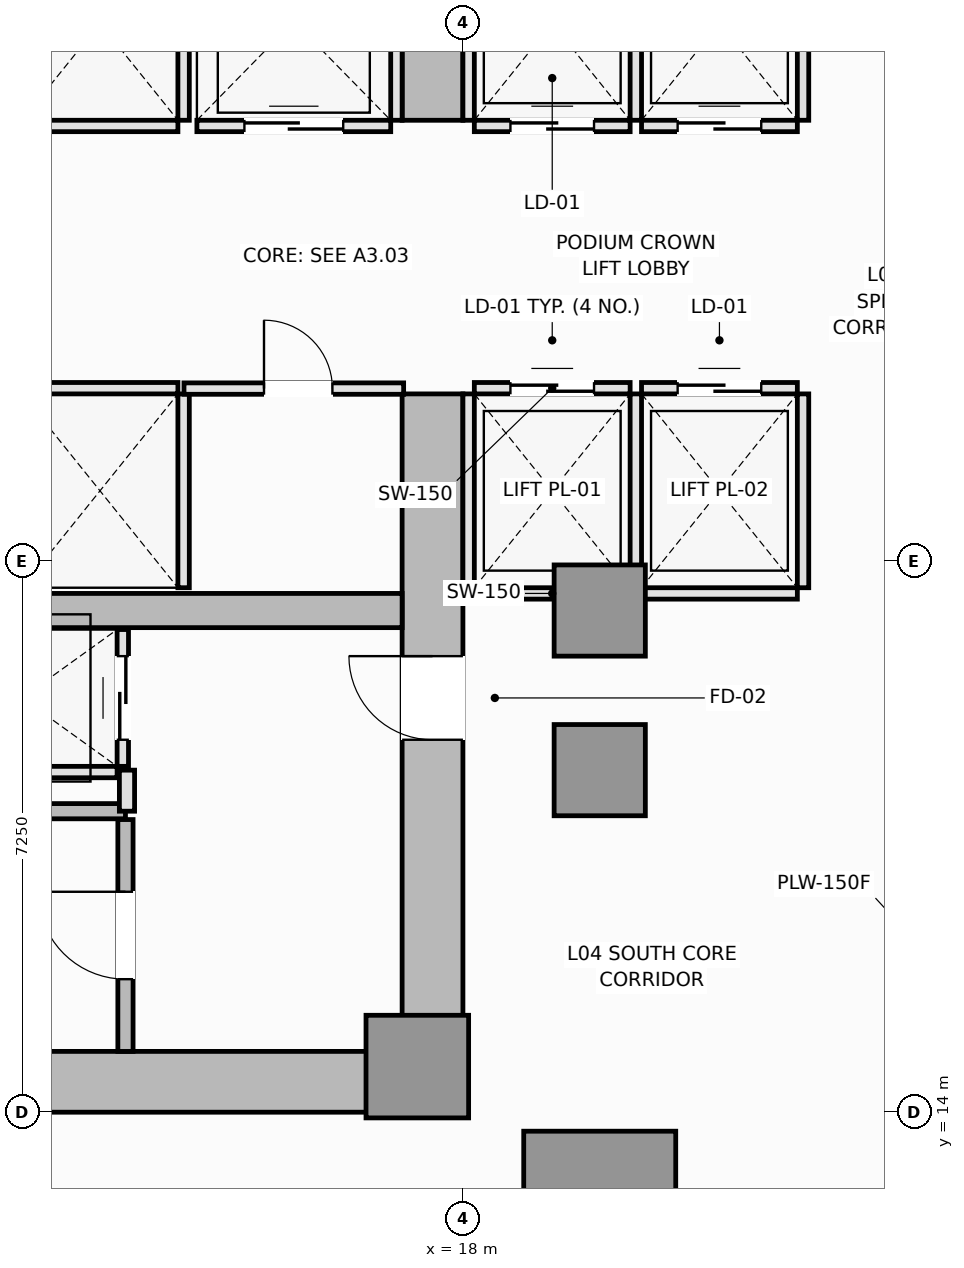
"""IFC4 building model, lengths in metres.
Left out: names, types, materials, properties, quantities, classifications, styles, units other than length and angle.
Written with IfcOpenShell. Run it as: python <this file> out.ifc"""

import sys

from ifc_helpers import new_model, si_unit, direction, frame, frame_2d, origin, origin_2d, place, context, subcontext, project, spatial, rectangle, extrude, element, fill, save


model = new_model("IFC4")
c1 = context("Model", 3, precision=1e-05, world=origin(), true_north=direction((0.0, 1.0)))
c2 = subcontext(c1, "Body", "Model", "MODEL_VIEW")
j1 = project(units=[si_unit("LENGTHUNIT", "METRE"), si_unit("PLANEANGLEUNIT", "RADIAN")], contexts=[c1])
p1 = place(None, origin())
s1 = spatial("IfcSite", under=j1, at=p1, CompositionType="ELEMENT")
p2 = place(p1, origin())
s2 = spatial("IfcBuilding", under=s1, at=p2, CompositionType="ELEMENT")
p3 = place(p2, frame((0.0, 0.0, 20.4)))
s3 = spatial("IfcBuildingStorey", under=s2, at=p3, CompositionType="ELEMENT", Elevation=20.4)
p4 = place(p3, frame((4.5, 14.4, 0.0), z_axis=(0.0, 0.0, 1.0), x_axis=(1.0, 0.0, 0.0)))
e1 = element("IfcWall", 1, at=p4, inside=s3, PredefinedType="SHEAR", context=c2, shape_type="SweptSolid", body=[
    extrude(rectangle(XDim=13.5, YDim=0.8, at=frame_2d((6.75, 0.0))), origin(), (0.0, 0.0, 1.0), 5.2),
])
p5 = place(p3, frame((17.6, 14.8, 0.0), z_axis=(0.0, 0.0, 1.0), x_axis=(0.0, 1.0, 0.0)))
e2 = element("IfcWall", 2, at=p5, inside=s3, PredefinedType="SHEAR", context=c2, shape_type="SweptSolid", body=[
    extrude(rectangle(XDim=8.65, YDim=0.8, at=frame_2d((4.325, 0.0))), origin(), (0.0, 0.0, 1.0), 5.2),
])
p6 = place(p5, frame((4.1, 0.0, 0.0)))
e3 = element("IfcOpeningElement", 3, at=p6, cuts=e2, PredefinedType="OPENING", context=c2, shape_type="SweptSolid", body=[
    extrude(rectangle(XDim=1.1, YDim=2.15, at=frame_2d((0.55, 1.075))), frame((0.0, 0.41, 0.0), z_axis=(0.0, -1.0, 0.0), x_axis=(1.0, 0.0, 0.0)), (0.0, 0.0, 1.0), 0.82),
])
p7 = place(p3, frame((17.6, 27.05, 0.0), z_axis=(0.0, 0.0, 1.0), x_axis=(0.0, 1.0, 0.0)))
e4 = element("IfcWall", 4, at=p7, inside=s3, PredefinedType="SHEAR", context=c2, shape_type="SweptSolid", body=[
    extrude(rectangle(XDim=8.65, YDim=0.8, at=frame_2d((4.325, 0.0))), origin(), (0.0, 0.0, 1.0), 5.2),
])
p8 = place(p7, frame((3.45, 0.0, 0.0)))
e5 = element("IfcOpeningElement", 5, at=p8, cuts=e4, PredefinedType="OPENING", context=c2, shape_type="SweptSolid", body=[
    extrude(rectangle(XDim=1.1, YDim=2.15, at=frame_2d((0.55, 1.075))), frame((0.0, 0.41, 0.0), z_axis=(0.0, -1.0, 0.0), x_axis=(1.0, 0.0, 0.0)), (0.0, 0.0, 1.0), 0.82),
])
p9 = place(p3, frame((5.3, 20.6, 0.0), z_axis=(0.0, 0.0, 1.0), x_axis=(1.0, 0.0, 0.0)))
e6 = element("IfcWall", 6, at=p9, inside=s3, PredefinedType="SHEAR", context=c2, shape_type="SweptSolid", body=[
    extrude(rectangle(XDim=11.9, YDim=0.45, at=frame_2d((5.95, 0.0))), origin(), (0.0, 0.0, 1.0), 5.2),
])
p10 = place(p3, frame((17.4, 14.6, 0.0), z_axis=(0.0, 0.0, 1.0), x_axis=(1.0, 0.0, 0.0)))
e7 = element("IfcColumn", 7, at=p10, inside=s3, PredefinedType="PILASTER", context=c2, shape_type="SweptSolid", body=[
    extrude(rectangle(XDim=1.35, YDim=1.35, at=origin_2d()), origin(), (0.0, 0.0, 1.0), 5.2),
])
p11 = place(p3, frame((19.8, 12.75, 0.0), z_axis=(0.0, 0.0, 1.0), x_axis=(1.0, 0.0, 0.0)))
e8 = element("IfcColumn", 8, at=p11, inside=s3, PredefinedType="COLUMN", context=c2, shape_type="SweptSolid", body=[
    extrude(rectangle(XDim=2.0, YDim=2.0, at=origin_2d()), origin(), (0.0, 0.0, 1.0), 5.2),
])
for number, where, z_axis, x_axis in (
    (9, (19.8, 18.5, 0.0), (0.0, 0.0, 1.0), (1.0, 0.0, 0.0)),
    (10, (19.8, 20.6, 0.0), (0.0, 0.0, 1.0), (1.0, 0.0, 0.0)),
):
    element("IfcColumn", number, at=place(p3, frame(where, z_axis=z_axis, x_axis=x_axis)), inside=s3, PredefinedType="COLUMN", context=c2, shape_type="SweptSolid", body=[
        extrude(rectangle(XDim=1.2, YDim=1.2, at=origin_2d()), origin(), (0.0, 0.0, 1.0), 5.2),
    ])
p12 = place(p3, frame((5.9, 17.96, 0.0), z_axis=(0.0, 0.0, 1.0), x_axis=(1.0, 0.0, 0.0)))
e11 = element("IfcWall", 11, at=p12, inside=s3, PredefinedType="SOLIDWALL", context=c2, shape_type="SweptSolid", body=[
    extrude(rectangle(XDim=7.66, YDim=0.2, at=frame_2d((3.83, 0.0))), origin(), (0.0, 0.0, 1.0), 5.2),
])
p13 = place(p3, frame((13.56, 14.8, 0.0), z_axis=(0.0, 0.0, 1.0), x_axis=(0.0, 1.0, 0.0)))
e12 = element("IfcWall", 12, at=p13, inside=s3, PredefinedType="SOLIDWALL", context=c2, shape_type="SweptSolid", body=[
    extrude(rectangle(XDim=3.05, YDim=0.2, at=frame_2d((1.525, 0.0))), origin(), (0.0, 0.0, 1.0), 5.2),
])
p14 = place(p13, frame((0.95, 0.0, 0.0)))
e13 = element("IfcOpeningElement", 13, at=p14, cuts=e12, PredefinedType="OPENING", context=c2, shape_type="SweptSolid", body=[
    extrude(rectangle(XDim=1.15, YDim=2.15, at=frame_2d((0.575, 1.075))), frame((0.0, 0.11, 0.0), z_axis=(0.0, -1.0, 0.0), x_axis=(1.0, 0.0, 0.0)), (0.0, 0.0, 1.0), 0.22),
])
p15 = place(p3, frame((18.15, 20.825, 0.0), z_axis=(0.0, 0.0, 1.0), x_axis=(1.0, 0.0, 0.0)))
e14 = element("IfcWall", 14, at=p15, inside=s3, PredefinedType="PARTITIONING", context=c2, shape_type="SweptSolid", body=[
    extrude(rectangle(XDim=2.05, YDim=0.15, at=frame_2d((1.025, 0.0))), origin(), (0.0, 0.0, 1.0), 5.02),
])
p16 = place(p3, frame((18.15, 23.525, 0.0), z_axis=(0.0, 0.0, 1.0), x_axis=(1.0, 0.0, 0.0)))
e15 = element("IfcWall", 15, at=p16, inside=s3, PredefinedType="PARTITIONING", context=c2, shape_type="SweptSolid", body=[
    extrude(rectangle(XDim=2.05, YDim=0.15, at=frame_2d((1.025, 0.0))), origin(), (0.0, 0.0, 1.0), 5.02),
])
p17 = place(p16, frame((0.475, 0.0, 0.0)))
e16 = element("IfcOpeningElement", 16, at=p17, cuts=e15, PredefinedType="OPENING", context=c2, shape_type="SweptSolid", body=[
    extrude(rectangle(XDim=1.1, YDim=2.2, at=frame_2d((0.55, 1.1))), frame((0.0, 0.085, 0.0), z_axis=(0.0, -1.0, 0.0), x_axis=(1.0, 0.0, 0.0)), (0.0, 0.0, 1.0), 0.17),
])
for number, where, z_axis, x_axis in (
    (17, (18.075, 20.9, 0.0), (0.0, 0.0, 1.0), (0.0, 1.0, 0.0)),
    (18, (20.275, 20.9, 0.0), (0.0, 0.0, 1.0), (0.0, 1.0, 0.0)),
):
    element("IfcWall", number, at=place(p3, frame(where, z_axis=z_axis, x_axis=x_axis)), inside=s3, PredefinedType="PARTITIONING", context=c2, shape_type="SweptSolid", body=[
        extrude(rectangle(XDim=2.55, YDim=0.15, at=frame_2d((1.275, 0.0))), origin(), (0.0, 0.0, 1.0), 5.02),
    ])
p18 = place(p3, frame((20.35, 20.825, 0.0), z_axis=(0.0, 0.0, 1.0), x_axis=(1.0, 0.0, 0.0)))
e19 = element("IfcWall", 19, at=p18, inside=s3, PredefinedType="PARTITIONING", context=c2, shape_type="SweptSolid", body=[
    extrude(rectangle(XDim=2.05, YDim=0.15, at=frame_2d((1.025, 0.0))), origin(), (0.0, 0.0, 1.0), 5.02),
])
p19 = place(p3, frame((20.35, 23.525, 0.0), z_axis=(0.0, 0.0, 1.0), x_axis=(1.0, 0.0, 0.0)))
e20 = element("IfcWall", 20, at=p19, inside=s3, PredefinedType="PARTITIONING", context=c2, shape_type="SweptSolid", body=[
    extrude(rectangle(XDim=2.05, YDim=0.15, at=frame_2d((1.025, 0.0))), origin(), (0.0, 0.0, 1.0), 5.02),
])
p20 = place(p19, frame((0.475, 0.0, 0.0)))
e21 = element("IfcOpeningElement", 21, at=p20, cuts=e20, PredefinedType="OPENING", context=c2, shape_type="SweptSolid", body=[
    extrude(rectangle(XDim=1.1, YDim=2.2, at=frame_2d((0.55, 1.1))), frame((0.0, 0.085, 0.0), z_axis=(0.0, -1.0, 0.0), x_axis=(1.0, 0.0, 0.0)), (0.0, 0.0, 1.0), 0.17),
])
p21 = place(p3, frame((22.475, 20.9, 0.0), z_axis=(0.0, 0.0, 1.0), x_axis=(0.0, 1.0, 0.0)))
e22 = element("IfcWall", 22, at=p21, inside=s3, PredefinedType="PARTITIONING", context=c2, shape_type="SweptSolid", body=[
    extrude(rectangle(XDim=2.55, YDim=0.15, at=frame_2d((1.275, 0.0))), origin(), (0.0, 0.0, 1.0), 4.57),
])
p22 = place(p3, frame((18.15, 26.975, 0.0), z_axis=(0.0, 0.0, 1.0), x_axis=(1.0, 0.0, 0.0)))
e23 = element("IfcWall", 23, at=p22, inside=s3, PredefinedType="PARTITIONING", context=c2, shape_type="SweptSolid", body=[
    extrude(rectangle(XDim=2.05, YDim=0.15, at=frame_2d((1.025, 0.0))), origin(), (0.0, 0.0, 1.0), 5.02),
])
p23 = place(p22, frame((0.475, 0.0, 0.0)))
e24 = element("IfcOpeningElement", 24, at=p23, cuts=e23, PredefinedType="OPENING", context=c2, shape_type="SweptSolid", body=[
    extrude(rectangle(XDim=1.1, YDim=2.2, at=frame_2d((0.55, 1.1))), frame((0.0, 0.085, 0.0), z_axis=(0.0, -1.0, 0.0), x_axis=(1.0, 0.0, 0.0)), (0.0, 0.0, 1.0), 0.17),
])
for number, where, z_axis, x_axis in (
    (25, (18.075, 27.05, 0.0), (0.0, 0.0, 1.0), (0.0, 1.0, 0.0)),
    (26, (20.275, 27.05, 0.0), (0.0, 0.0, 1.0), (0.0, 1.0, 0.0)),
):
    element("IfcWall", number, at=place(p3, frame(where, z_axis=z_axis, x_axis=x_axis)), inside=s3, PredefinedType="PARTITIONING", context=c2, shape_type="SweptSolid", body=[
        extrude(rectangle(XDim=2.55, YDim=0.15, at=frame_2d((1.275, 0.0))), origin(), (0.0, 0.0, 1.0), 5.02),
    ])
p24 = place(p3, frame((20.35, 26.975, 0.0), z_axis=(0.0, 0.0, 1.0), x_axis=(1.0, 0.0, 0.0)))
e27 = element("IfcWall", 27, at=p24, inside=s3, PredefinedType="PARTITIONING", context=c2, shape_type="SweptSolid", body=[
    extrude(rectangle(XDim=2.05, YDim=0.15, at=frame_2d((1.025, 0.0))), origin(), (0.0, 0.0, 1.0), 5.02),
])
p25 = place(p24, frame((0.475, 0.0, 0.0)))
e28 = element("IfcOpeningElement", 28, at=p25, cuts=e27, PredefinedType="OPENING", context=c2, shape_type="SweptSolid", body=[
    extrude(rectangle(XDim=1.1, YDim=2.2, at=frame_2d((0.55, 1.1))), frame((0.0, 0.085, 0.0), z_axis=(0.0, -1.0, 0.0), x_axis=(1.0, 0.0, 0.0)), (0.0, 0.0, 1.0), 0.17),
])
p26 = place(p3, frame((22.475, 27.05, 0.0), z_axis=(0.0, 0.0, 1.0), x_axis=(0.0, 1.0, 0.0)))
e29 = element("IfcWall", 29, at=p26, inside=s3, PredefinedType="PARTITIONING", context=c2, shape_type="SweptSolid", body=[
    extrude(rectangle(XDim=2.55, YDim=0.15, at=frame_2d((1.275, 0.0))), origin(), (0.0, 0.0, 1.0), 4.57),
])
p27 = place(p3, frame((12.2, 23.525, 0.0), z_axis=(0.0, 0.0, 1.0), x_axis=(1.0, 0.0, 0.0)))
e30 = element("IfcWall", 30, at=p27, inside=s3, PredefinedType="PARTITIONING", context=c2, shape_type="SweptSolid", body=[
    extrude(rectangle(XDim=2.05, YDim=0.15, at=frame_2d((1.025, 0.0))), origin(), (0.0, 0.0, 1.0), 5.02),
])
p28 = place(p3, frame((14.325, 20.9, 0.0), z_axis=(0.0, 0.0, 1.0), x_axis=(0.0, 1.0, 0.0)))
e31 = element("IfcWall", 31, at=p28, inside=s3, PredefinedType="PARTITIONING", context=c2, shape_type="SweptSolid", body=[
    extrude(rectangle(XDim=2.55, YDim=0.15, at=frame_2d((1.275, 0.0))), origin(), (0.0, 0.0, 1.0), 5.02),
])
p29 = place(p3, frame((12.2, 26.975, 0.0), z_axis=(0.0, 0.0, 1.0), x_axis=(1.0, 0.0, 0.0)))
e32 = element("IfcWall", 32, at=p29, inside=s3, PredefinedType="PARTITIONING", context=c2, shape_type="SweptSolid", body=[
    extrude(rectangle(XDim=2.05, YDim=0.15, at=frame_2d((1.025, 0.0))), origin(), (0.0, 0.0, 1.0), 5.02),
])
p30 = place(p3, frame((14.325, 27.05, 0.0), z_axis=(0.0, 0.0, 1.0), x_axis=(0.0, 1.0, 0.0)))
e33 = element("IfcWall", 33, at=p30, inside=s3, PredefinedType="PARTITIONING", context=c2, shape_type="SweptSolid", body=[
    extrude(rectangle(XDim=2.55, YDim=0.15, at=frame_2d((1.275, 0.0))), origin(), (0.0, 0.0, 1.0), 5.02),
])
p31 = place(p3, frame((14.5, 26.975, 0.0), z_axis=(0.0, 0.0, 1.0), x_axis=(1.0, 0.0, 0.0)))
e34 = element("IfcWall", 34, at=p31, inside=s3, PredefinedType="PARTITIONING", context=c2, shape_type="SweptSolid", body=[
    extrude(rectangle(XDim=2.55, YDim=0.15, at=frame_2d((1.275, 0.0))), origin(), (0.0, 0.0, 1.0), 5.02),
])
p32 = place(p31, frame((0.625, 0.0, 0.0)))
e35 = element("IfcOpeningElement", 35, at=p32, cuts=e34, PredefinedType="OPENING", context=c2, shape_type="SweptSolid", body=[
    extrude(rectangle(XDim=1.3, YDim=2.2, at=frame_2d((0.65, 1.1))), frame((0.0, 0.085, 0.0), z_axis=(0.0, -1.0, 0.0), x_axis=(1.0, 0.0, 0.0)), (0.0, 0.0, 1.0), 0.17),
])
p33 = place(p3, frame((17.125, 27.05, 0.0), z_axis=(0.0, 0.0, 1.0), x_axis=(0.0, 1.0, 0.0)))
e36 = element("IfcWall", 36, at=p33, inside=s3, PredefinedType="PARTITIONING", context=c2, shape_type="SweptSolid", body=[
    extrude(rectangle(XDim=2.6, YDim=0.15, at=frame_2d((1.3, 0.0))), origin(), (0.0, 0.0, 1.0), 5.02),
])
p34 = place(p3, frame((10.95, 18.475, 0.0), z_axis=(0.0, 0.0, 1.0), x_axis=(1.0, 0.0, 0.0)))
e37 = element("IfcWall", 37, at=p34, inside=s3, PredefinedType="PARTITIONING", context=c2, shape_type="SweptSolid", body=[
    extrude(rectangle(XDim=2.5, YDim=0.15, at=frame_2d((1.25, 0.0))), origin(), (0.0, 0.0, 1.0), 5.02),
])
p35 = place(p3, frame((13.525, 18.55, 0.0), z_axis=(0.0, 0.0, 1.0), x_axis=(0.0, 1.0, 0.0)))
e38 = element("IfcWall", 38, at=p35, inside=s3, PredefinedType="PARTITIONING", context=c2, shape_type="SweptSolid", body=[
    extrude(rectangle(XDim=1.8, YDim=0.15, at=frame_2d((0.9, 0.0))), origin(), (0.0, 0.0, 1.0), 5.02),
])
p36 = place(p35, frame((0.35, 0.0, 0.0)))
e39 = element("IfcOpeningElement", 39, at=p36, cuts=e38, PredefinedType="OPENING", context=c2, shape_type="SweptSolid", body=[
    extrude(rectangle(XDim=1.1, YDim=2.2, at=frame_2d((0.55, 1.1))), frame((0.0, 0.085, 0.0), z_axis=(0.0, -1.0, 0.0), x_axis=(1.0, 0.0, 0.0)), (0.0, 0.0, 1.0), 0.17),
])
p37 = place(p3, frame((13.58, 17.96, 0.0), z_axis=(0.0, 0.0, 1.0), x_axis=(0.0, 1.0, 0.0)))
e40 = element("IfcWall", 40, at=p37, inside=s3, PredefinedType="PARTITIONING", context=c2, shape_type="SweptSolid", body=[
    extrude(rectangle(XDim=0.54, YDim=0.2, at=frame_2d((0.27, 0.0))), origin(), (0.0, 0.0, 1.0), 5.02),
])
p38 = place(p3, frame((14.33, 23.52, 0.0), z_axis=(0.0, 0.0, 1.0), x_axis=(1.0, 0.0, 0.0)))
e41 = element("IfcWall", 41, at=p38, inside=s3, PredefinedType="PARTITIONING", context=c2, shape_type="SweptSolid", body=[
    extrude(rectangle(XDim=2.89, YDim=0.15, at=frame_2d((1.445, 0.0))), origin(), (0.0, 0.0, 1.0), 5.02),
])
p39 = place(p38, frame((1.053, 0.0, 0.0)))
e42 = element("IfcOpeningElement", 42, at=p39, cuts=e41, PredefinedType="OPENING", context=c2, shape_type="SweptSolid", body=[
    extrude(rectangle(XDim=0.9, YDim=2.1, at=frame_2d((0.45, 1.05))), frame((0.0, 0.085, 0.0), z_axis=(0.0, -1.0, 0.0), x_axis=(1.0, 0.0, 0.0)), (0.0, 0.0, 1.0), 0.17),
])
p40 = place(p14, origin())
e43 = element("IfcDoor", 43, at=p40, inside=s3, OperationType="SINGLE_SWING_RIGHT", PredefinedType="DOOR", context=c2, shape_type="SweptSolid", body=[
    extrude(rectangle(XDim=1.15, YDim=2.15, at=frame_2d((0.575, 1.075))), frame((0.0, 0.025, 0.0), z_axis=(0.0, -1.0, 0.0), x_axis=(1.0, 0.0, 0.0)), (0.0, 0.0, 1.0), 0.05),
])
fill(e13, e43)
p41 = place(p17, origin())
e44 = element("IfcDoor", 44, at=p41, inside=s3, OperationType="DOUBLE_DOOR_SLIDING", PredefinedType="DOOR", context=c2, shape_type="SweptSolid", body=[
    extrude(rectangle(XDim=1.1, YDim=2.2, at=frame_2d((0.55, 1.1))), frame((0.0, 0.025, 0.0), z_axis=(0.0, -1.0, 0.0), x_axis=(1.0, 0.0, 0.0)), (0.0, 0.0, 1.0), 0.05),
])
fill(e16, e44)
p42 = place(p20, origin())
e45 = element("IfcDoor", 45, at=p42, inside=s3, OperationType="DOUBLE_DOOR_SLIDING", PredefinedType="DOOR", context=c2, shape_type="SweptSolid", body=[
    extrude(rectangle(XDim=1.1, YDim=2.2, at=frame_2d((0.55, 1.1))), frame((0.0, 0.025, 0.0), z_axis=(0.0, -1.0, 0.0), x_axis=(1.0, 0.0, 0.0)), (0.0, 0.0, 1.0), 0.05),
])
fill(e21, e45)
p43 = place(p23, origin())
e46 = element("IfcDoor", 46, at=p43, inside=s3, OperationType="DOUBLE_DOOR_SLIDING", PredefinedType="DOOR", context=c2, shape_type="SweptSolid", body=[
    extrude(rectangle(XDim=1.1, YDim=2.2, at=frame_2d((0.55, 1.1))), frame((0.0, 0.025, 0.0), z_axis=(0.0, -1.0, 0.0), x_axis=(1.0, 0.0, 0.0)), (0.0, 0.0, 1.0), 0.05),
])
fill(e24, e46)
p44 = place(p25, origin())
e47 = element("IfcDoor", 47, at=p44, inside=s3, OperationType="DOUBLE_DOOR_SLIDING", PredefinedType="DOOR", context=c2, shape_type="SweptSolid", body=[
    extrude(rectangle(XDim=1.1, YDim=2.2, at=frame_2d((0.55, 1.1))), frame((0.0, 0.025, 0.0), z_axis=(0.0, -1.0, 0.0), x_axis=(1.0, 0.0, 0.0)), (0.0, 0.0, 1.0), 0.05),
])
fill(e28, e47)
p45 = place(p32, origin())
e48 = element("IfcDoor", 48, at=p45, inside=s3, OperationType="DOUBLE_DOOR_SLIDING", PredefinedType="DOOR", context=c2, shape_type="SweptSolid", body=[
    extrude(rectangle(XDim=1.3, YDim=2.2, at=frame_2d((0.65, 1.1))), frame((0.0, 0.025, 0.0), z_axis=(0.0, -1.0, 0.0), x_axis=(1.0, 0.0, 0.0)), (0.0, 0.0, 1.0), 0.05),
])
fill(e35, e48)
p46 = place(p36, origin())
e49 = element("IfcDoor", 49, at=p46, inside=s3, OperationType="DOUBLE_DOOR_SLIDING", PredefinedType="DOOR", context=c2, shape_type="SweptSolid", body=[
    extrude(rectangle(XDim=1.1, YDim=2.2, at=frame_2d((0.55, 1.1))), frame((0.0, 0.025, 0.0), z_axis=(0.0, -1.0, 0.0), x_axis=(1.0, 0.0, 0.0)), (0.0, 0.0, 1.0), 0.05),
])
fill(e39, e49)
p47 = place(p6, origin())
e50 = element("IfcDoor", 50, at=p47, inside=s3, OperationType="SINGLE_SWING_RIGHT", PredefinedType="DOOR", context=c2, shape_type="SweptSolid", body=[
    extrude(rectangle(XDim=1.1, YDim=2.15, at=frame_2d((0.55, 1.075))), frame((0.0, 0.025, 0.0), z_axis=(0.0, -1.0, 0.0), x_axis=(1.0, 0.0, 0.0)), (0.0, 0.0, 1.0), 0.05),
])
fill(e3, e50)
p48 = place(p39, origin())
e51 = element("IfcDoor", 51, at=p48, inside=s3, OperationType="SINGLE_SWING_LEFT", PredefinedType="DOOR", context=c2, shape_type="SweptSolid", body=[
    extrude(rectangle(XDim=0.9, YDim=2.1, at=frame_2d((0.45, 1.05))), frame((0.0, 0.025, 0.0), z_axis=(0.0, -1.0, 0.0), x_axis=(1.0, 0.0, 0.0)), (0.0, 0.0, 1.0), 0.05),
])
fill(e42, e51)
save(model, sys.argv[1])
